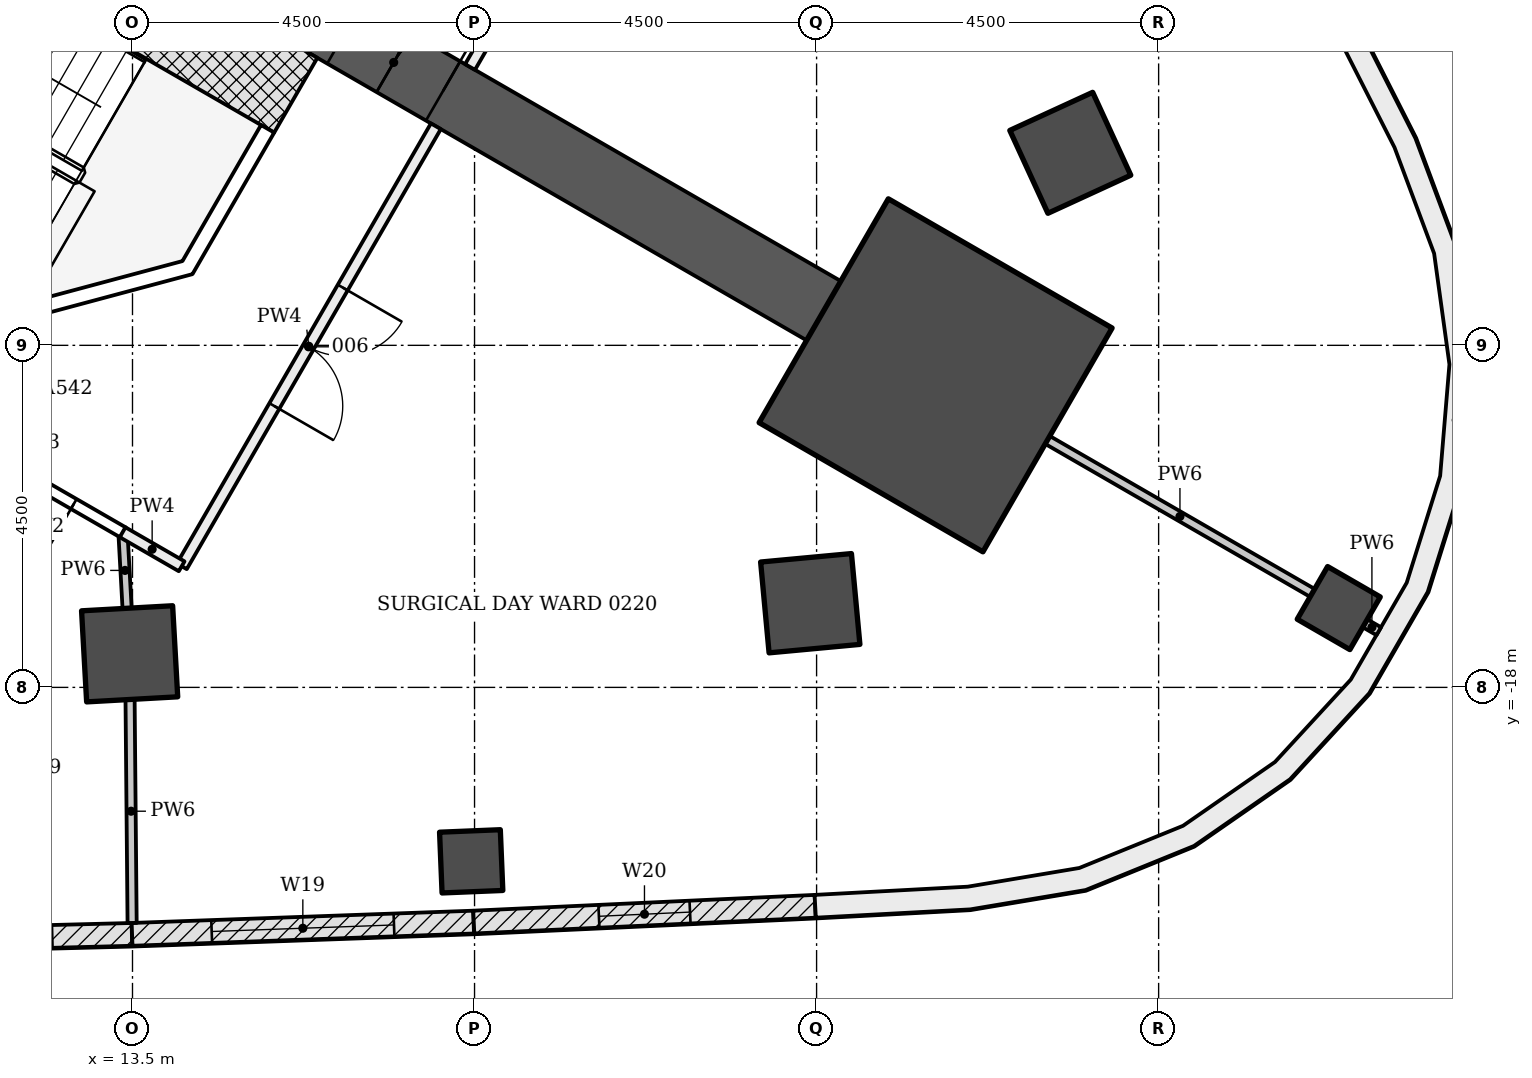
"""IFC4 building model, lengths in metres.
Left out: names, types, materials, properties, quantities, classifications, styles, units other than length and angle.
Written with IfcOpenShell. Run it as: python <this file> out.ifc"""

import sys

from ifc_helpers import new_model, si_unit, direction, frame, frame_2d, origin, origin_2d, place, context, subcontext, project, spatial, polyline, rectangle, outline, extrude, element, fill, save


model = new_model("IFC4")
c1 = context("Model", 3, precision=1e-05, world=origin(), true_north=direction((0.0, 1.0)))
c2 = subcontext(c1, "Body", "Model", "MODEL_VIEW")
j1 = project(units=[si_unit("LENGTHUNIT", "METRE"), si_unit("PLANEANGLEUNIT", "RADIAN")], contexts=[c1])
p1 = place(None, origin())
s1 = spatial("IfcSite", under=j1, at=p1, CompositionType="ELEMENT")
p2 = place(p1, origin())
s2 = spatial("IfcBuilding", under=s1, at=p2, CompositionType="ELEMENT")
p3 = place(p2, frame((0.0, 0.0, 10.5)))
s3 = spatial("IfcBuildingStorey", under=s2, at=p3, CompositionType="ELEMENT", Elevation=10.5)
for number, where, z_axis, x_axis in (
    (1, (13.462, -17.558, -0.25), (0.0, 0.0, 1.0), (0.056, -0.998, 0.0)),
    (2, (22.417, -16.893, -0.25), (0.0, 0.0, 1.0), (0.093, -0.996, 0.0)),
    (3, (25.838, -10.967, -0.25), (0.0, 0.0, 1.0), (0.909, 0.418, 0.0)),
):
    element("IfcColumn", number, at=place(p3, frame(where, z_axis=z_axis, x_axis=x_axis)), inside=s3, PredefinedType="COLUMN", context=c2, shape_type="SweptSolid", body=[
        extrude(rectangle(XDim=1.2, YDim=1.2, at=origin_2d()), origin(), (0.0, 0.0, 1.0), 4.5),
    ])
for number, where, z_axis, x_axis in (
    (4, (17.956, -20.288, -0.25), (0.0, 0.0, 1.0), (0.041, -0.999, 0.0)),
    (5, (29.37, -16.957, -0.25), (0.0, 0.0, 1.0), (0.866, -0.5, 0.0)),
):
    element("IfcColumn", number, at=place(p3, frame(where, z_axis=z_axis, x_axis=x_axis)), inside=s3, PredefinedType="COLUMN", context=c2, shape_type="SweptSolid", body=[
        extrude(rectangle(XDim=0.8, YDim=0.8, at=origin_2d()), origin(), (0.0, 0.0, 1.0), 4.5),
    ])
p4 = place(p3, frame((9.922, -5.728, -0.25), z_axis=(0.0, 0.0, 1.0), x_axis=(0.866028046028, -0.499995423472, 0.0)))
e6 = element("IfcWall", 6, at=p4, inside=s3, PredefinedType="SHEAR", context=c2, shape_type="SweptSolid", body=[
    extrude(rectangle(XDim=14.633, YDim=0.9, at=frame_2d((7.316, 0.0))), origin(), (0.0, 0.0, 1.0), 4.5),
])
p5 = place(p4, frame((7.35, 0.0, 0.25)))
e7 = element("IfcOpeningElement", 7, at=p5, cuts=e6, PredefinedType="OPENING", context=c2, shape_type="SweptSolid", body=[
    extrude(rectangle(XDim=1.5, YDim=2.1, at=frame_2d((0.75, 1.05))), frame((0.0, 0.46, 0.0), z_axis=(0.0, -1.0, 0.0), x_axis=(1.0, 0.0, 0.0)), (0.0, 0.0, 1.0), 0.92),
])
p6 = place(p3, frame((24.066, -13.895, -0.25), z_axis=(0.0, 0.0, 1.0), x_axis=(0.866025403784, -0.5, 0.0)))
e8 = element("IfcColumn", 8, at=p6, inside=s3, PredefinedType="COLUMN", context=c2, shape_type="SweptSolid", body=[
    extrude(rectangle(XDim=3.4, YDim=3.4, at=origin_2d()), origin(), (0.0, 0.0, 1.0), 4.5),
])
p7 = place(p3, frame((13.492, -21.25, 0.0), z_axis=(0.0, 0.0, 1.0), x_axis=(-0.999671466587, -0.025631209312, 0.0)))
e9 = element("IfcWall", 9, at=p7, inside=s3, PredefinedType="NOTDEFINED", context=c2, shape_type="SweptSolid", body=[
    extrude(rectangle(XDim=4.496, YDim=0.3, at=frame_2d((2.248, 0.0))), origin(), (0.0, 0.0, 1.0), 4.25),
])
p8 = place(p7, frame((1.048, 0.0, 0.9)))
e10 = element("IfcOpeningElement", 10, at=p8, cuts=e9, PredefinedType="OPENING", context=c2, shape_type="SweptSolid", body=[
    extrude(rectangle(XDim=2.4, YDim=2.4, at=frame_2d((1.2, 1.2))), frame((0.0, 0.16, 0.0), z_axis=(0.0, -1.0, 0.0), x_axis=(1.0, 0.0, 0.0)), (0.0, 0.0, 1.0), 0.32),
])
p9 = place(p3, frame((17.988, -21.088, 0.0), z_axis=(0.0, 0.0, 1.0), x_axis=(-0.999355640029, -0.035892962294, 0.0)))
e11 = element("IfcWall", 11, at=p9, inside=s3, PredefinedType="NOTDEFINED", context=c2, shape_type="SweptSolid", body=[
    extrude(rectangle(XDim=4.496, YDim=0.3, at=frame_2d((2.248, 0.0))), origin(), (0.0, 0.0, 1.0), 4.25),
])
p10 = place(p9, frame((1.048, 0.0, 0.9)))
e12 = element("IfcOpeningElement", 12, at=p10, cuts=e11, PredefinedType="OPENING", context=c2, shape_type="SweptSolid", body=[
    extrude(rectangle(XDim=2.4, YDim=2.4, at=frame_2d((1.2, 1.2))), frame((0.0, 0.16, 0.0), z_axis=(0.0, -1.0, 0.0), x_axis=(1.0, 0.0, 0.0)), (0.0, 0.0, 1.0), 0.32),
])
p11 = place(p3, frame((22.481, -20.88, 0.0), z_axis=(0.0, 0.0, 1.0), x_axis=(-0.998931717866, -0.046210637742, 0.0)))
e13 = element("IfcWall", 13, at=p11, inside=s3, PredefinedType="NOTDEFINED", context=c2, shape_type="SweptSolid", body=[
    extrude(rectangle(XDim=4.496, YDim=0.3, at=frame_2d((2.248, 0.0))), origin(), (0.0, 0.0, 1.0), 4.25),
])
p12 = place(p11, frame((1.648, 0.0, 0.8)))
e14 = element("IfcOpeningElement", 14, at=p12, cuts=e13, PredefinedType="OPENING", context=c2, shape_type="SweptSolid", body=[
    extrude(rectangle(XDim=1.2, YDim=3.0, at=frame_2d((0.6, 1.5))), frame((0.0, 0.16, 0.0), z_axis=(0.0, -1.0, 0.0), x_axis=(1.0, 0.0, 0.0)), (0.0, 0.0, 1.0), 0.32),
])
p13 = place(p3, origin())
e15 = element("IfcWall", 15, at=p13, inside=s3, PredefinedType="NOTDEFINED", context=c2, shape_type="SweptSolid", body=[
    extrude(outline(polyline([(22.49, -21.03), (24.522, -20.921), (26.04, -20.666), (27.465, -20.086), (28.729, -19.209), (29.771, -18.077), (30.54, -16.744), (31.0, -15.276), (31.128, -13.742), (30.917, -12.218), (30.379, -10.776), (29.457, -8.962), (29.19, -9.098), (30.104, -10.897), (30.625, -12.292), (30.826, -13.75), (30.704, -15.218), (30.264, -16.623), (29.528, -17.898), (28.531, -18.981), (27.321, -19.821), (25.957, -20.376), (24.489, -20.622), (22.474, -20.73), (22.49, -21.03)])), origin(), (0.0, 0.0, 1.0), 4.25),
])
p14 = place(p3, frame((9.413, -6.61, -0.25), z_axis=(0.0, 0.0, 1.0), x_axis=(0.866018442252, -0.500012057535, 0.0)))
e16 = element("IfcWall", 16, at=p14, inside=s3, PredefinedType="SHEAR", context=c2, shape_type="SweptSolid", body=[
    extrude(rectangle(XDim=7.2, YDim=1.136, at=frame_2d((3.6, 0.0))), origin(), (0.0, 0.0, 1.0), 4.5),
])
p15 = place(p3, frame((0.0, 0.0, -0.25)))
e17 = element("IfcWall", 17, at=p15, inside=s3, PredefinedType="SHEAR", context=c2, shape_type="SweptSolid", body=[
    extrude(outline(polyline([(12.104, -13.149), (14.289, -12.563), (15.364, -10.701), (15.191, -10.601), (14.157, -12.392), (12.132, -12.934), (12.204, -12.976), (12.204, -12.976), (12.204, -12.976), (12.204, -12.976), (12.204, -12.976), (12.204, -12.976), (12.204, -12.976), (12.204, -12.976), (12.204, -12.976), (12.204, -12.976), (12.204, -12.976), (12.204, -12.976), (12.204, -12.976), (12.204, -12.976), (12.204, -12.976), (12.204, -12.976), (12.204, -12.976), (12.104, -13.149)])), origin(), (0.0, 0.0, 1.0), 4.5),
])
p16 = place(p3, frame((13.429, -16.959, 0.0), z_axis=(0.0, 0.0, 1.0), x_axis=(-0.055063393043, 0.998482860517, 0.0)))
e18 = element("IfcWall", 18, at=p16, inside=s3, PredefinedType="PARTITIONING", context=c2, shape_type="SweptSolid", body=[
    extrude(rectangle(XDim=0.998, YDim=0.12, at=frame_2d((0.499, 0.0))), origin(), (0.0, 0.0, 1.0), 3.638),
])
p17 = place(p3, frame((13.495, -21.099, 0.0), z_axis=(0.0, 0.0, 1.0), x_axis=(-0.009216581037, 0.999957526415, 0.0)))
e19 = element("IfcWall", 19, at=p17, inside=s3, PredefinedType="PARTITIONING", context=c2, shape_type="SweptSolid", body=[
    extrude(rectangle(XDim=2.94, YDim=0.12, at=frame_2d((1.47, 0.0))), origin(), (0.0, 0.0, 1.0), 3.633),
])
p18 = place(p3, frame((13.377, -15.962, 0.0), z_axis=(0.0, 0.0, 1.0), x_axis=(-0.866302389159, 0.499519940081, 0.0)))
e20 = element("IfcWall", 20, at=p18, inside=s3, PredefinedType="PARTITIONING", context=c2, shape_type="SweptSolid", body=[
    extrude(rectangle(XDim=2.47, YDim=0.15, at=frame_2d((1.235, 0.0))), origin(), (0.0, 0.0, 1.0), 3.638),
])
p19 = place(p18, frame((0.75, 0.0, 0.0)))
e21 = element("IfcOpeningElement", 21, at=p19, cuts=e20, PredefinedType="OPENING", context=c2, shape_type="SweptSolid", body=[
    extrude(rectangle(XDim=1.0, YDim=2.1, at=frame_2d((0.5, 1.05))), frame((0.0, 0.085, 0.0), z_axis=(0.0, -1.0, 0.0), x_axis=(1.0, 0.0, 0.0)), (0.0, 0.0, 1.0), 0.17),
])
p20 = place(p3, frame((17.491, -10.618, 0.0), z_axis=(0.0, 0.0, 1.0), x_axis=(-0.499969057507, -0.866043267704, 0.0)))
e22 = element("IfcWall", 22, at=p20, inside=s3, PredefinedType="PARTITIONING", context=c2, shape_type="SweptSolid", body=[
    extrude(rectangle(XDim=6.685, YDim=0.15, at=frame_2d((3.342, 0.0))), origin(), (0.0, 0.0, 1.0), 3.638),
])
p21 = place(p20, frame((2.45, 0.0, 0.0)))
e23 = element("IfcOpeningElement", 23, at=p21, cuts=e22, PredefinedType="OPENING", context=c2, shape_type="SweptSolid", body=[
    extrude(rectangle(XDim=1.8, YDim=2.1, at=frame_2d((0.9, 1.05))), frame((0.0, 0.085, 0.0), z_axis=(0.0, -1.0, 0.0), x_axis=(1.0, 0.0, 0.0)), (0.0, 0.0, 1.0), 0.17),
])
p22 = place(p3, frame((14.147, -16.407, 0.0), z_axis=(0.0, 0.0, 1.0), x_axis=(-0.866276218641, 0.499565324075, 0.0)))
e24 = element("IfcWall", 24, at=p22, inside=s3, PredefinedType="PARTITIONING", context=c2, shape_type="SweptSolid", body=[
    extrude(rectangle(XDim=0.897, YDim=0.15, at=frame_2d((0.448, 0.0))), origin(), (0.0, 0.0, 1.0), 3.638),
])
p23 = place(p3, frame((29.023, -16.757, 0.0), z_axis=(0.0, 0.0, 1.0), x_axis=(-0.866027971625, 0.499995552344, 0.0)))
e25 = element("IfcWall", 25, at=p23, inside=s3, PredefinedType="PARTITIONING", context=c2, shape_type="SweptSolid", body=[
    extrude(rectangle(XDim=4.024, YDim=0.12, at=frame_2d((2.012, 0.0))), origin(), (0.0, 0.0, 1.0), 3.717),
])
p24 = place(p3, frame((29.896, -17.261, 0.0), z_axis=(0.0, 0.0, 1.0), x_axis=(-0.865774595023, 0.500434162116, 0.0)))
e26 = element("IfcWall", 26, at=p24, inside=s3, PredefinedType="PARTITIONING", context=c2, shape_type="SweptSolid", body=[
    extrude(rectangle(XDim=0.208, YDim=0.12, at=frame_2d((0.104, 0.0))), origin(), (0.0, 0.0, 1.0), 4.25),
])
p25 = place(p3, frame((18.84, -8.281, 0.0), z_axis=(0.0, 0.0, 1.0), x_axis=(-0.500126010714, -0.86595263924, 0.0)))
e27 = element("IfcWall", 27, at=p25, inside=s3, PredefinedType="PARTITIONING", context=c2, shape_type="SweptSolid", body=[
    extrude(rectangle(XDim=1.798, YDim=0.15, at=frame_2d((0.899, 0.0))), origin(), (0.0, 0.0, 1.0), 3.638),
])
p26 = place(p8, origin())
e28 = element("IfcWindow", 28, at=p26, inside=s3, PartitioningType="DOUBLE_PANEL_VERTICAL", PredefinedType="WINDOW", context=c2, shape_type="SweptSolid", body=[
    extrude(rectangle(XDim=2.4, YDim=2.4, at=frame_2d((1.2, 1.2))), frame((0.0, 0.03, 0.0), z_axis=(0.0, -1.0, 0.0), x_axis=(1.0, 0.0, 0.0)), (0.0, 0.0, 1.0), 0.06),
])
fill(e10, e28)
p27 = place(p10, origin())
e29 = element("IfcWindow", 29, at=p27, inside=s3, PartitioningType="DOUBLE_PANEL_VERTICAL", PredefinedType="WINDOW", context=c2, shape_type="SweptSolid", body=[
    extrude(rectangle(XDim=2.4, YDim=2.4, at=frame_2d((1.2, 1.2))), frame((0.0, 0.03, 0.0), z_axis=(0.0, -1.0, 0.0), x_axis=(1.0, 0.0, 0.0)), (0.0, 0.0, 1.0), 0.06),
])
fill(e12, e29)
p28 = place(p12, origin())
e30 = element("IfcWindow", 30, at=p28, inside=s3, PartitioningType="SINGLE_PANEL", PredefinedType="WINDOW", context=c2, shape_type="SweptSolid", body=[
    extrude(rectangle(XDim=1.2, YDim=3.0, at=frame_2d((0.6, 1.5))), frame((0.0, 0.03, 0.0), z_axis=(0.0, -1.0, 0.0), x_axis=(1.0, 0.0, 0.0)), (0.0, 0.0, 1.0), 0.06),
])
fill(e14, e30)
p29 = place(p19, origin())
e31 = element("IfcDoor", 31, at=p29, inside=s3, OperationType="SINGLE_SWING_RIGHT", PredefinedType="DOOR", context=c2, shape_type="SweptSolid", body=[
    extrude(rectangle(XDim=1.0, YDim=2.1, at=frame_2d((0.5, 1.05))), frame((0.0, 0.025, 0.0), z_axis=(0.0, -1.0, 0.0), x_axis=(1.0, 0.0, 0.0)), (0.0, 0.0, 1.0), 0.05),
])
fill(e21, e31)
p30 = place(p21, origin())
e32 = element("IfcDoor", 32, at=p30, inside=s3, OperationType="DOUBLE_DOOR_SINGLE_SWING", PredefinedType="DOOR", context=c2, shape_type="SweptSolid", body=[
    extrude(rectangle(XDim=1.8, YDim=2.1, at=frame_2d((0.9, 1.05))), frame((0.0, 0.025, 0.0), z_axis=(0.0, -1.0, 0.0), x_axis=(1.0, 0.0, 0.0)), (0.0, 0.0, 1.0), 0.05),
])
fill(e23, e32)
p31 = place(p5, origin())
e33 = element("IfcDoor", 33, at=p31, inside=s3, OperationType="DOUBLE_DOOR_SINGLE_SWING", PredefinedType="DOOR", context=c2, shape_type="SweptSolid", body=[
    extrude(rectangle(XDim=1.5, YDim=2.1, at=frame_2d((0.75, 1.05))), frame((0.0, 0.025, 0.0), z_axis=(0.0, -1.0, 0.0), x_axis=(1.0, 0.0, 0.0)), (0.0, 0.0, 1.0), 0.05),
])
fill(e7, e33)
save(model, sys.argv[1])
